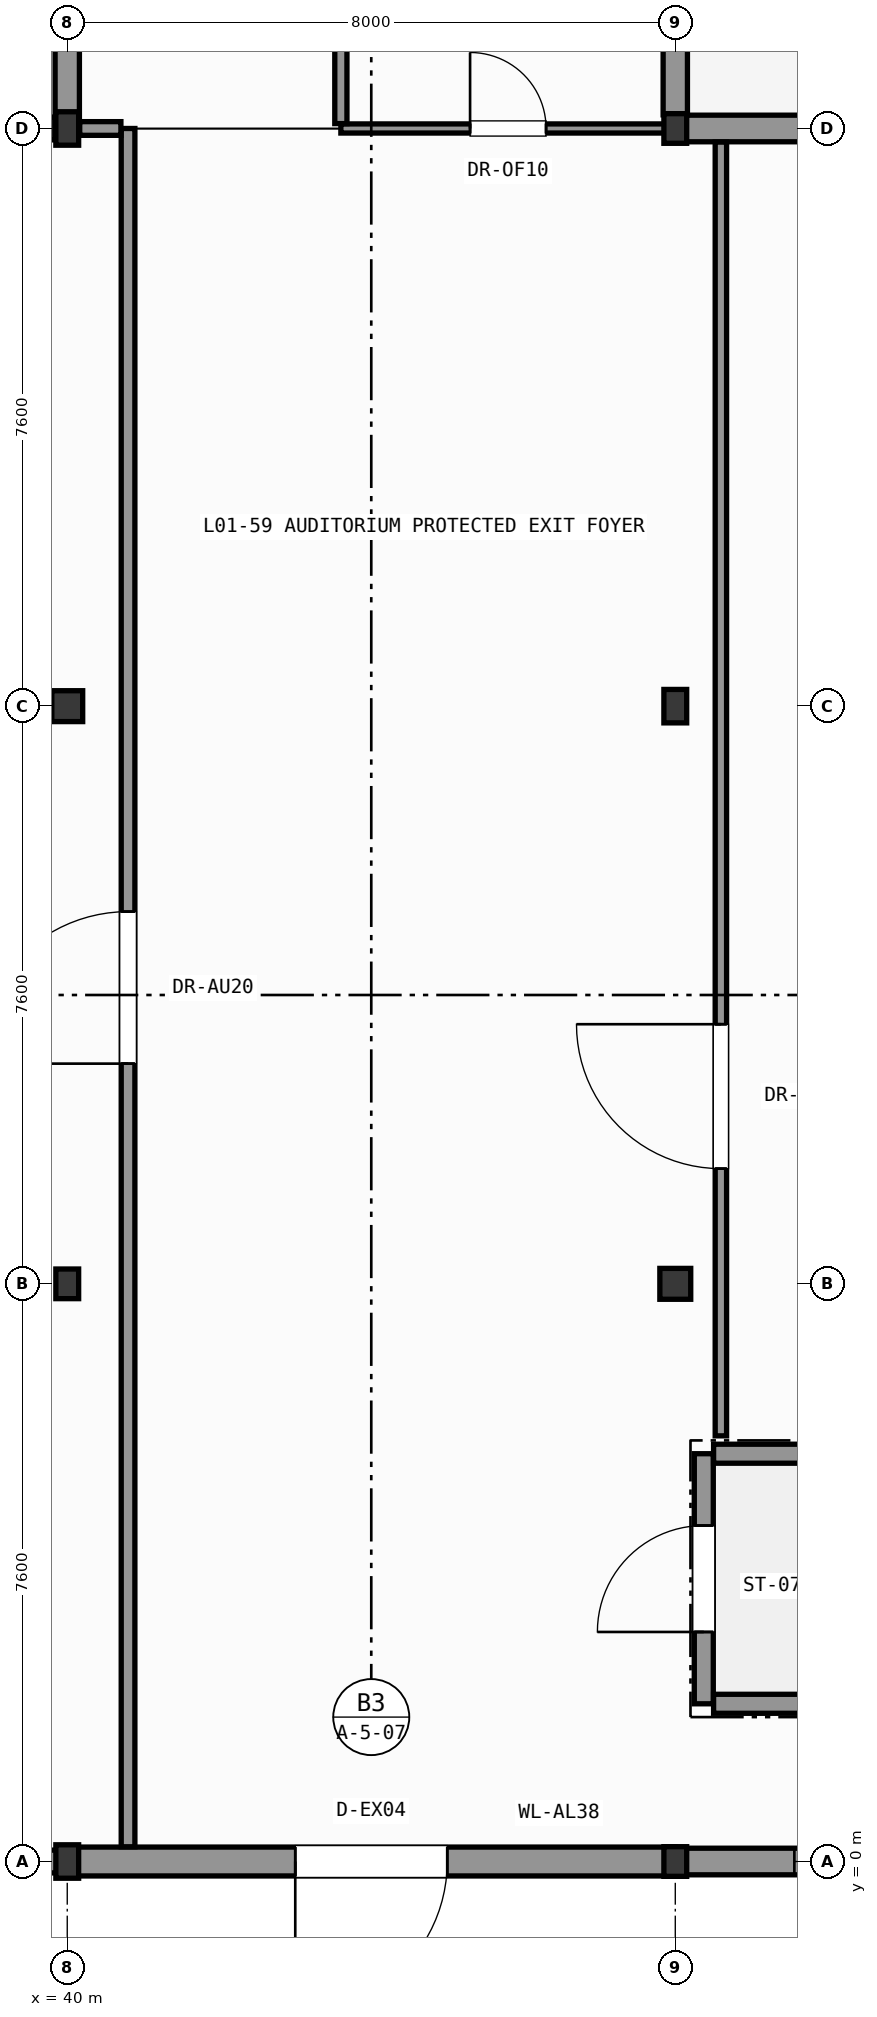
"""IFC4 building model, lengths in metres.
Left out: names, types, materials, properties, quantities, classifications, styles, units other than length and angle.
Written with IfcOpenShell. Run it as: python <this file> out.ifc"""

import sys

from ifc_helpers import new_model, si_unit, direction, frame, frame_2d, origin, origin_2d, place, context, subcontext, project, spatial, rectangle, hollow_circle, i_section, extrude, element, fill, save


model = new_model("IFC4")
c1 = context("Model", 3, precision=1e-05, world=origin(), true_north=direction((0.0, 1.0)))
c2 = subcontext(c1, "Body", "Model", "MODEL_VIEW")
j1 = project(units=[si_unit("LENGTHUNIT", "METRE"), si_unit("PLANEANGLEUNIT", "RADIAN")], contexts=[c1])
p1 = place(None, origin())
s1 = spatial("IfcSite", under=j1, at=p1, CompositionType="ELEMENT")
p2 = place(p1, origin())
s2 = spatial("IfcBuilding", under=s1, at=p2, CompositionType="ELEMENT")
p3 = place(p2, origin())
s3 = spatial("IfcBuildingStorey", under=s2, at=p3, CompositionType="ELEMENT", Elevation=0.0)
p4 = place(p3, frame((40.0, 0.0, 0.0), z_axis=(0.0, 0.0, 1.0), x_axis=(1.0, 0.0, 0.0)))
e1 = element("IfcColumn", 1, at=p4, inside=s3, PredefinedType="COLUMN", context=c2, shape_type="SweptSolid", body=[
    extrude(i_section(OverallWidth=0.3, OverallDepth=0.44, WebThickness=0.011, FlangeThickness=0.021, FilletRadius=0.027, at=origin_2d()), origin(), (0.0, 0.0, 1.0), 7.8),
])
p5 = place(p3, frame((40.0, 7.6, 0.0), z_axis=(0.0, 0.0, 1.0), x_axis=(1.0, 0.0, 0.0)))
e2 = element("IfcColumn", 2, at=p5, inside=s3, PredefinedType="COLUMN", context=c2, shape_type="SweptSolid", body=[
    extrude(i_section(OverallWidth=0.3, OverallDepth=0.39, WebThickness=0.011, FlangeThickness=0.019, FilletRadius=0.027, at=origin_2d()), origin(), (0.0, 0.0, 1.0), 7.8),
])
p6 = place(p3, frame((40.0, 15.2, 0.0), z_axis=(0.0, 0.0, 1.0), x_axis=(1.0, 0.0, 0.0)))
e3 = element("IfcColumn", 3, at=p6, inside=s3, PredefinedType="COLUMN", context=c2, shape_type="SweptSolid", body=[
    extrude(hollow_circle(Radius=0.203, WallThickness=0.02, at=origin_2d()), origin(), (0.0, 0.0, 1.0), 7.8),
])
p7 = place(p3, frame((40.0, 22.8, 0.0), z_axis=(0.0, 0.0, 1.0), x_axis=(1.0, 0.0, 0.0)))
e4 = element("IfcColumn", 4, at=p7, inside=s3, PredefinedType="COLUMN", context=c2, shape_type="SweptSolid", body=[
    extrude(i_section(OverallWidth=0.3, OverallDepth=0.44, WebThickness=0.011, FlangeThickness=0.021, FilletRadius=0.027, at=origin_2d()), origin(), (0.0, 0.0, 1.0), 7.8),
])
p8 = place(p3, frame((48.0, 0.0, 0.0), z_axis=(0.0, 0.0, 1.0), x_axis=(1.0, 0.0, 0.0)))
e5 = element("IfcColumn", 5, at=p8, inside=s3, PredefinedType="COLUMN", context=c2, shape_type="SweptSolid", body=[
    extrude(i_section(OverallWidth=0.3, OverallDepth=0.39, WebThickness=0.011, FlangeThickness=0.019, FilletRadius=0.027, at=origin_2d()), origin(), (0.0, 0.0, 1.0), 7.8),
])
p9 = place(p3, frame((48.0, 7.6, 0.0), z_axis=(0.0, 0.0, 1.0), x_axis=(1.0, 0.0, 0.0)))
e6 = element("IfcColumn", 6, at=p9, inside=s3, PredefinedType="COLUMN", context=c2, shape_type="SweptSolid", body=[
    extrude(hollow_circle(Radius=0.203, WallThickness=0.02, at=origin_2d()), origin(), (0.0, 0.0, 1.0), 7.8),
])
p10 = place(p3, frame((48.0, 15.2, 0.0), z_axis=(0.0, 0.0, 1.0), x_axis=(1.0, 0.0, 0.0)))
e7 = element("IfcColumn", 7, at=p10, inside=s3, PredefinedType="COLUMN", context=c2, shape_type="SweptSolid", body=[
    extrude(i_section(OverallWidth=0.3, OverallDepth=0.44, WebThickness=0.011, FlangeThickness=0.021, FilletRadius=0.027, at=origin_2d()), origin(), (0.0, 0.0, 1.0), 7.8),
])
p11 = place(p3, frame((48.0, 22.8, 0.0), z_axis=(0.0, 0.0, 1.0), x_axis=(1.0, 0.0, 0.0)))
e8 = element("IfcColumn", 8, at=p11, inside=s3, PredefinedType="COLUMN", context=c2, shape_type="SweptSolid", body=[
    extrude(i_section(OverallWidth=0.3, OverallDepth=0.39, WebThickness=0.011, FlangeThickness=0.019, FilletRadius=0.027, at=origin_2d()), origin(), (0.0, 0.0, 1.0), 7.8),
])
p12 = place(p3, frame((40.0, 22.8, 0.0), z_axis=(0.0, 0.0, 1.0), x_axis=(0.0, 1.0, 0.0)))
e9 = element("IfcWall", 9, at=p12, inside=s3, PredefinedType="SOLIDWALL", context=c2, shape_type="SweptSolid", body=[
    extrude(rectangle(XDim=7.6, YDim=0.32, at=frame_2d((3.8, 0.0))), origin(), (0.0, 0.0, 1.0), 7.025),
])
p13 = place(p12, frame((2.6, 0.0, 0.95)))
e10 = element("IfcOpeningElement", 10, at=p13, cuts=e9, PredefinedType="OPENING", context=c2, shape_type="SweptSolid", body=[
    extrude(rectangle(XDim=2.4, YDim=3.0, at=frame_2d((1.2, 1.5))), frame((0.0, 0.17, 0.0), z_axis=(0.0, -1.0, 0.0), x_axis=(1.0, 0.0, 0.0)), (0.0, 0.0, 1.0), 0.34),
])
p14 = place(p3, frame((32.0, 22.8, 0.0), z_axis=(0.0, 0.0, 1.0), x_axis=(1.0, 0.0, 0.0)))
e11 = element("IfcWall", 11, at=p14, inside=s3, PredefinedType="SOLIDWALL", context=c2, shape_type="SweptSolid", body=[
    extrude(rectangle(XDim=7.836, YDim=0.3, at=frame_2d((3.918, 0.0))), origin(), (0.0, 0.0, 1.0), 7.165),
])
p15 = place(p3, frame((40.0, 0.0, 0.0), z_axis=(0.0, 0.0, 1.0), x_axis=(-1.0, 0.0, 0.0)))
e12 = element("IfcWall", 12, at=p15, inside=s3, PredefinedType="SOLIDWALL", context=c2, shape_type="SweptSolid", body=[
    extrude(rectangle(XDim=8.0, YDim=0.3, at=frame_2d((4.0, 0.0))), origin(), (0.0, 0.0, 1.0), 7.135),
])
p16 = place(p3, frame((48.0, 0.0, 0.0), z_axis=(0.0, 0.0, 1.0), x_axis=(-1.0, 0.0, 0.0)))
e13 = element("IfcWall", 13, at=p16, inside=s3, PredefinedType="SOLIDWALL", context=c2, shape_type="SweptSolid", body=[
    extrude(rectangle(XDim=8.0, YDim=0.38, at=frame_2d((4.0, 0.0))), origin(), (0.0, 0.0, 1.0), 7.135),
])
p17 = place(p16, frame((3.0, 0.0, 0.0)))
e14 = element("IfcOpeningElement", 14, at=p17, cuts=e13, PredefinedType="OPENING", context=c2, shape_type="SweptSolid", body=[
    extrude(rectangle(XDim=2.0, YDim=2.6, at=frame_2d((1.0, 1.3))), frame((0.0, 0.2, 0.0), z_axis=(0.0, -1.0, 0.0), x_axis=(1.0, 0.0, 0.0)), (0.0, 0.0, 1.0), 0.4),
])
p18 = place(p3, frame((56.0, 0.0, 0.0), z_axis=(0.0, 0.0, 1.0), x_axis=(-1.0, 0.0, 0.0)))
e15 = element("IfcWall", 15, at=p18, inside=s3, PredefinedType="SOLIDWALL", context=c2, shape_type="SweptSolid", body=[
    extrude(rectangle(XDim=8.0, YDim=0.35, at=frame_2d((4.0, 0.0))), origin(), (0.0, 0.0, 1.0), 7.135),
])
p19 = place(p18, frame((1.567, 0.0, 0.95)))
e16 = element("IfcOpeningElement", 16, at=p19, cuts=e15, PredefinedType="OPENING", context=c2, shape_type="SweptSolid", body=[
    extrude(rectangle(XDim=2.2, YDim=4.2, at=frame_2d((1.1, 2.1))), frame((0.0, 0.185, 0.0), z_axis=(0.0, -1.0, 0.0), x_axis=(1.0, 0.0, 0.0)), (0.0, 0.0, 1.0), 0.37),
])
p20 = place(p18, frame((4.233, 0.0, 0.95)))
e17 = element("IfcOpeningElement", 17, at=p20, cuts=e15, PredefinedType="OPENING", context=c2, shape_type="SweptSolid", body=[
    extrude(rectangle(XDim=2.2, YDim=4.2, at=frame_2d((1.1, 2.1))), frame((0.0, 0.185, 0.0), z_axis=(0.0, -1.0, 0.0), x_axis=(1.0, 0.0, 0.0)), (0.0, 0.0, 1.0), 0.37),
])
p21 = place(p3, frame((48.0, 22.8, 0.0), z_axis=(0.0, 0.0, 1.0), x_axis=(1.0, 0.0, 0.0)))
e18 = element("IfcWall", 18, at=p21, inside=s3, PredefinedType="SOLIDWALL", context=c2, shape_type="SweptSolid", body=[
    extrude(rectangle(XDim=7.806, YDim=0.35, at=frame_2d((3.903, 0.0))), origin(), (0.0, 0.0, 1.0), 7.075),
])
p22 = place(p21, frame((2.703, 0.0, 0.95)))
e19 = element("IfcOpeningElement", 19, at=p22, cuts=e18, PredefinedType="OPENING", context=c2, shape_type="SweptSolid", body=[
    extrude(rectangle(XDim=2.4, YDim=3.0, at=frame_2d((1.2, 1.5))), frame((0.0, 0.185, 0.0), z_axis=(0.0, -1.0, 0.0), x_axis=(1.0, 0.0, 0.0)), (0.0, 0.0, 1.0), 0.37),
])
p23 = place(p3, frame((48.0, 30.4, 0.0), z_axis=(0.0, 0.0, 1.0), x_axis=(0.0, -1.0, 0.0)))
e20 = element("IfcWall", 20, at=p23, inside=s3, PredefinedType="SOLIDWALL", context=c2, shape_type="SweptSolid", body=[
    extrude(rectangle(XDim=7.421, YDim=0.32, at=frame_2d((3.71, 0.0))), origin(), (0.0, 0.0, 1.0), 7.025),
])
p24 = place(p23, frame((2.611, 0.0, 0.95)))
e21 = element("IfcOpeningElement", 21, at=p24, cuts=e20, PredefinedType="OPENING", context=c2, shape_type="SweptSolid", body=[
    extrude(rectangle(XDim=2.2, YDim=4.2, at=frame_2d((1.1, 2.1))), frame((0.0, 0.17, 0.0), z_axis=(0.0, -1.0, 0.0), x_axis=(1.0, 0.0, 0.0)), (0.0, 0.0, 1.0), 0.34),
])
p25 = place(p3, frame((48.375, 2.075, 0.0), z_axis=(0.0, 0.0, 1.0), x_axis=(0.0, 1.0, 0.0)))
e22 = element("IfcWall", 22, at=p25, inside=s3, PredefinedType="SHEAR", context=c2, shape_type="SweptSolid", body=[
    extrude(rectangle(XDim=3.29, YDim=0.25, at=frame_2d((1.645, 0.0))), origin(), (0.0, 0.0, 1.0), 7.54),
])
p26 = place(p25, frame((0.945, 0.0, 0.0)))
e23 = element("IfcOpeningElement", 23, at=p26, cuts=e22, PredefinedType="OPENING", context=c2, shape_type="SweptSolid", body=[
    extrude(rectangle(XDim=1.4, YDim=2.2, at=frame_2d((0.7, 1.1))), frame((0.0, 0.135, 0.0), z_axis=(0.0, -1.0, 0.0), x_axis=(1.0, 0.0, 0.0)), (0.0, 0.0, 1.0), 0.27),
])
for number, where, z_axis, x_axis in (
    (24, (48.504, 2.075, 0.0), (0.0, 0.0, 1.0), (1.0, 0.0, 0.0)),
    (25, (48.504, 5.365, 0.0), (0.0, 0.0, 1.0), (1.0, 0.0, 0.0)),
):
    element("IfcWall", number, at=place(p3, frame(where, z_axis=z_axis, x_axis=x_axis)), inside=s3, PredefinedType="SHEAR", context=c2, shape_type="SweptSolid", body=[
        extrude(rectangle(XDim=6.892, YDim=0.25, at=frame_2d((3.446, 0.0))), origin(), (0.0, 0.0, 1.0), 7.54),
    ])
p27 = place(p3, frame((40.8, 0.194, 0.0), z_axis=(0.0, 0.0, 1.0), x_axis=(0.0, 1.0, 0.0)))
e26 = element("IfcWall", 26, at=p27, inside=s3, PredefinedType="PARTITIONING", context=c2, shape_type="SweptSolid", body=[
    extrude(rectangle(XDim=22.606, YDim=0.18, at=frame_2d((11.303, 0.0))), origin(), (0.0, 0.0, 1.0), 7.54),
])
p28 = place(p27, frame((10.303, 0.0, 0.0)))
e27 = element("IfcOpeningElement", 27, at=p28, cuts=e26, PredefinedType="OPENING", context=c2, shape_type="SweptSolid", body=[
    extrude(rectangle(XDim=2.0, YDim=2.4, at=frame_2d((1.0, 1.2))), frame((0.0, 0.1, 0.0), z_axis=(0.0, -1.0, 0.0), x_axis=(1.0, 0.0, 0.0)), (0.0, 0.0, 1.0), 0.2),
])
p29 = place(p3, frame((40.164, 22.8, 0.0), z_axis=(0.0, 0.0, 1.0), x_axis=(1.0, 0.0, 0.0)))
e28 = element("IfcWall", 28, at=p29, inside=s3, PredefinedType="PARTITIONING", context=c2, shape_type="SweptSolid", body=[
    extrude(rectangle(XDim=0.542, YDim=0.18, at=frame_2d((0.271, 0.0))), origin(), (0.0, 0.0, 1.0), 7.075),
])
p30 = place(p3, frame((48.6, 5.6, 0.0), z_axis=(0.0, 0.0, 1.0), x_axis=(0.0, 1.0, 0.0)))
e29 = element("IfcWall", 29, at=p30, inside=s3, PredefinedType="PARTITIONING", context=c2, shape_type="SweptSolid", body=[
    extrude(rectangle(XDim=17.021, YDim=0.15, at=frame_2d((8.51, 0.0))), origin(), (0.0, 0.0, 1.0), 7.54),
])
p31 = place(p30, frame((3.516, 0.0, 0.0)))
e30 = element("IfcOpeningElement", 30, at=p31, cuts=e29, PredefinedType="OPENING", context=c2, shape_type="SweptSolid", body=[
    extrude(rectangle(XDim=1.9, YDim=2.5, at=frame_2d((0.95, 1.25))), frame((0.0, 0.085, 0.0), z_axis=(0.0, -1.0, 0.0), x_axis=(1.0, 0.0, 0.0)), (0.0, 0.0, 1.0), 0.17),
])
p32 = place(p3, frame((43.6, 22.8, 0.0), z_axis=(0.0, 0.0, 1.0), x_axis=(1.0, 0.0, 0.0)))
e31 = element("IfcWall", 31, at=p32, inside=s3, PredefinedType="PARTITIONING", context=c2, shape_type="SweptSolid", body=[
    extrude(rectangle(XDim=4.4, YDim=0.12, at=frame_2d((2.2, 0.0))), origin(), (0.0, 0.0, 1.0), 7.075),
])
p33 = place(p32, frame((1.7, 0.0, 0.0)))
e32 = element("IfcOpeningElement", 32, at=p33, cuts=e31, PredefinedType="OPENING", context=c2, shape_type="SweptSolid", body=[
    extrude(rectangle(XDim=1.0, YDim=2.15, at=frame_2d((0.5, 1.075))), frame((0.0, 0.07, 0.0), z_axis=(0.0, -1.0, 0.0), x_axis=(1.0, 0.0, 0.0)), (0.0, 0.0, 1.0), 0.14),
])
p34 = place(p3, frame((43.6, 22.864, 0.0), z_axis=(0.0, 0.0, 1.0), x_axis=(0.0, 1.0, 0.0)))
e33 = element("IfcWall", 33, at=p34, inside=s3, PredefinedType="PARTITIONING", context=c2, shape_type="SweptSolid", body=[
    extrude(rectangle(XDim=29.652, YDim=0.16, at=frame_2d((14.826, 0.0))), origin(), (0.0, 0.0, 1.0), 7.54),
])
p35 = place(p34, frame((13.726, 0.0, 0.0)))
e34 = element("IfcOpeningElement", 34, at=p35, cuts=e33, PredefinedType="OPENING", context=c2, shape_type="SweptSolid", body=[
    extrude(rectangle(XDim=2.2, YDim=2.6, at=frame_2d((1.1, 1.3))), frame((0.0, 0.09, 0.0), z_axis=(0.0, -1.0, 0.0), x_axis=(1.0, 0.0, 0.0)), (0.0, 0.0, 1.0), 0.18),
])
p36 = place(p17, origin())
e35 = element("IfcDoor", 35, at=p36, inside=s3, OperationType="SINGLE_SWING_RIGHT", PredefinedType="DOOR", context=c2, shape_type="SweptSolid", body=[
    extrude(rectangle(XDim=2.0, YDim=2.6, at=frame_2d((1.0, 1.3))), frame((0.0, 0.025, 0.0), z_axis=(0.0, -1.0, 0.0), x_axis=(1.0, 0.0, 0.0)), (0.0, 0.0, 1.0), 0.05),
])
fill(e14, e35)
p37 = place(p20, origin())
e36 = element("IfcWindow", 36, at=p37, inside=s3, PartitioningType="SINGLE_PANEL", PredefinedType="WINDOW", context=c2, shape_type="SweptSolid", body=[
    extrude(rectangle(XDim=2.2, YDim=4.2, at=frame_2d((1.1, 2.1))), frame((0.0, 0.03, 0.0), z_axis=(0.0, -1.0, 0.0), x_axis=(1.0, 0.0, 0.0)), (0.0, 0.0, 1.0), 0.06),
])
fill(e17, e36)
p38 = place(p26, origin())
e37 = element("IfcDoor", 37, at=p38, inside=s3, OperationType="SINGLE_SWING_LEFT", PredefinedType="DOOR", context=c2, shape_type="SweptSolid", body=[
    extrude(rectangle(XDim=1.4, YDim=2.2, at=frame_2d((0.7, 1.1))), frame((0.0, 0.025, 0.0), z_axis=(0.0, -1.0, 0.0), x_axis=(1.0, 0.0, 0.0)), (0.0, 0.0, 1.0), 0.05),
])
fill(e23, e37)
p39 = place(p28, origin())
e38 = element("IfcDoor", 38, at=p39, inside=s3, OperationType="SINGLE_SWING_LEFT", PredefinedType="DOOR", context=c2, shape_type="SweptSolid", body=[
    extrude(rectangle(XDim=2.0, YDim=2.4, at=frame_2d((1.0, 1.2))), frame((0.0, 0.025, 0.0), z_axis=(0.0, -1.0, 0.0), x_axis=(1.0, 0.0, 0.0)), (0.0, 0.0, 1.0), 0.05),
])
fill(e27, e38)
p40 = place(p31, origin())
e39 = element("IfcDoor", 39, at=p40, inside=s3, OperationType="SINGLE_SWING_RIGHT", PredefinedType="DOOR", context=c2, shape_type="SweptSolid", body=[
    extrude(rectangle(XDim=1.9, YDim=2.5, at=frame_2d((0.95, 1.25))), frame((0.0, 0.025, 0.0), z_axis=(0.0, -1.0, 0.0), x_axis=(1.0, 0.0, 0.0)), (0.0, 0.0, 1.0), 0.05),
])
fill(e30, e39)
p41 = place(p33, origin())
e40 = element("IfcDoor", 40, at=p41, inside=s3, OperationType="SINGLE_SWING_LEFT", PredefinedType="DOOR", context=c2, shape_type="SweptSolid", body=[
    extrude(rectangle(XDim=1.0, YDim=2.15, at=frame_2d((0.5, 1.075))), frame((0.0, 0.025, 0.0), z_axis=(0.0, -1.0, 0.0), x_axis=(1.0, 0.0, 0.0)), (0.0, 0.0, 1.0), 0.05),
])
fill(e32, e40)
save(model, sys.argv[1])
